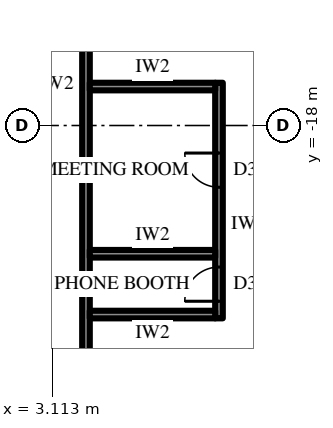
"""IFC4 building model, lengths in metres.
Left out: names, types, materials, properties, quantities, classifications, styles, units other than length and angle.
Written with IfcOpenShell. Run it as: python <this file> out.ifc"""

import sys

from ifc_helpers import new_model, si_unit, direction, frame, frame_2d, origin, place, context, subcontext, project, spatial, rectangle, extrude, element, fill, save


model = new_model("IFC4")
c1 = context("Model", 3, precision=1e-05, world=origin(), true_north=direction((0.0, 1.0)))
c2 = subcontext(c1, "Body", "Model", "MODEL_VIEW")
j1 = project(units=[si_unit("LENGTHUNIT", "METRE"), si_unit("PLANEANGLEUNIT", "RADIAN")], contexts=[c1])
p1 = place(None, origin())
s1 = spatial("IfcSite", under=j1, at=p1, CompositionType="ELEMENT")
p2 = place(p1, origin())
s2 = spatial("IfcBuilding", under=s1, at=p2, CompositionType="ELEMENT")
p3 = place(p2, frame((0.0, 0.0, 223.9)))
s3 = spatial("IfcBuildingStorey", under=s2, at=p3, CompositionType="ELEMENT", Elevation=223.9)
p4 = place(p3, frame((4.0, -12.3, 0.0), z_axis=(0.0, 0.0, 1.0), x_axis=(0.0, -1.0, 0.0)))
e1 = element("IfcWall", 1, at=p4, inside=s3, PredefinedType="PARTITIONING", context=c2, shape_type="SweptSolid", body=[
    extrude(rectangle(XDim=15.35, YDim=0.2, at=frame_2d((7.675, 0.0))), origin(), (0.0, 0.0, 1.0), 4.0),
])
p5 = place(p3, frame((7.5, -16.875, 0.0), z_axis=(0.0, 0.0, 1.0), x_axis=(0.0, -1.0, 0.0)))
e2 = element("IfcWall", 2, at=p5, inside=s3, PredefinedType="PARTITIONING", context=c2, shape_type="SweptSolid", body=[
    extrude(rectangle(XDim=6.2, YDim=0.2, at=frame_2d((3.1, 0.0))), origin(), (0.0, 0.0, 1.0), 4.0),
])
p6 = place(p5, frame((1.85, 0.0, 0.0)))
e3 = element("IfcOpeningElement", 3, at=p6, cuts=e2, PredefinedType="OPENING", context=c2, shape_type="SweptSolid", body=[
    extrude(rectangle(XDim=0.9, YDim=2.2, at=frame_2d((0.45, 1.1))), frame((0.0, 0.11, 0.0), z_axis=(0.0, -1.0, 0.0), x_axis=(1.0, 0.0, 0.0)), (0.0, 0.0, 1.0), 0.22),
])
p7 = place(p5, frame((4.85, 0.0, 0.0)))
e4 = element("IfcOpeningElement", 4, at=p7, cuts=e2, PredefinedType="OPENING", context=c2, shape_type="SweptSolid", body=[
    extrude(rectangle(XDim=0.9, YDim=2.2, at=frame_2d((0.45, 1.1))), frame((0.0, 0.11, 0.0), z_axis=(0.0, -1.0, 0.0), x_axis=(1.0, 0.0, 0.0)), (0.0, 0.0, 1.0), 0.22),
])
for number, where, z_axis, x_axis in (
    (5, (4.1, -16.975, 0.0), (0.0, 0.0, 1.0), (1.0, 0.0, 0.0)),
    (6, (4.1, -21.375, 0.0), (0.0, 0.0, 1.0), (1.0, 0.0, 0.0)),
    (7, (4.1, -22.975, 0.0), (0.0, 0.0, 1.0), (1.0, 0.0, 0.0)),
):
    element("IfcWall", number, at=place(p3, frame(where, z_axis=z_axis, x_axis=x_axis)), inside=s3, PredefinedType="PARTITIONING", context=c2, shape_type="SweptSolid", body=[
        extrude(rectangle(XDim=3.3, YDim=0.2, at=frame_2d((1.65, 0.0))), origin(), (0.0, 0.0, 1.0), 4.0),
    ])
p8 = place(p6, frame((0.9, 0.0, 0.0), z_axis=(0.0, 0.0, 1.0), x_axis=(-1.0, 0.0, 0.0)))
e8 = element("IfcDoor", 8, at=p8, inside=s3, OperationType="SINGLE_SWING_LEFT", PredefinedType="DOOR", context=c2, shape_type="SweptSolid", body=[
    extrude(rectangle(XDim=0.9, YDim=2.2, at=frame_2d((0.45, 1.1))), frame((0.0, 0.025, 0.0), z_axis=(0.0, -1.0, 0.0), x_axis=(1.0, 0.0, 0.0)), (0.0, 0.0, 1.0), 0.05),
])
fill(e3, e8)
p9 = place(p7, frame((0.9, 0.0, 0.0), z_axis=(0.0, 0.0, 1.0), x_axis=(-1.0, 0.0, 0.0)))
e9 = element("IfcDoor", 9, at=p9, inside=s3, OperationType="SINGLE_SWING_RIGHT", PredefinedType="DOOR", context=c2, shape_type="SweptSolid", body=[
    extrude(rectangle(XDim=0.9, YDim=2.2, at=frame_2d((0.45, 1.1))), frame((0.0, 0.025, 0.0), z_axis=(0.0, -1.0, 0.0), x_axis=(1.0, 0.0, 0.0)), (0.0, 0.0, 1.0), 0.05),
])
fill(e4, e9)
save(model, sys.argv[1])
